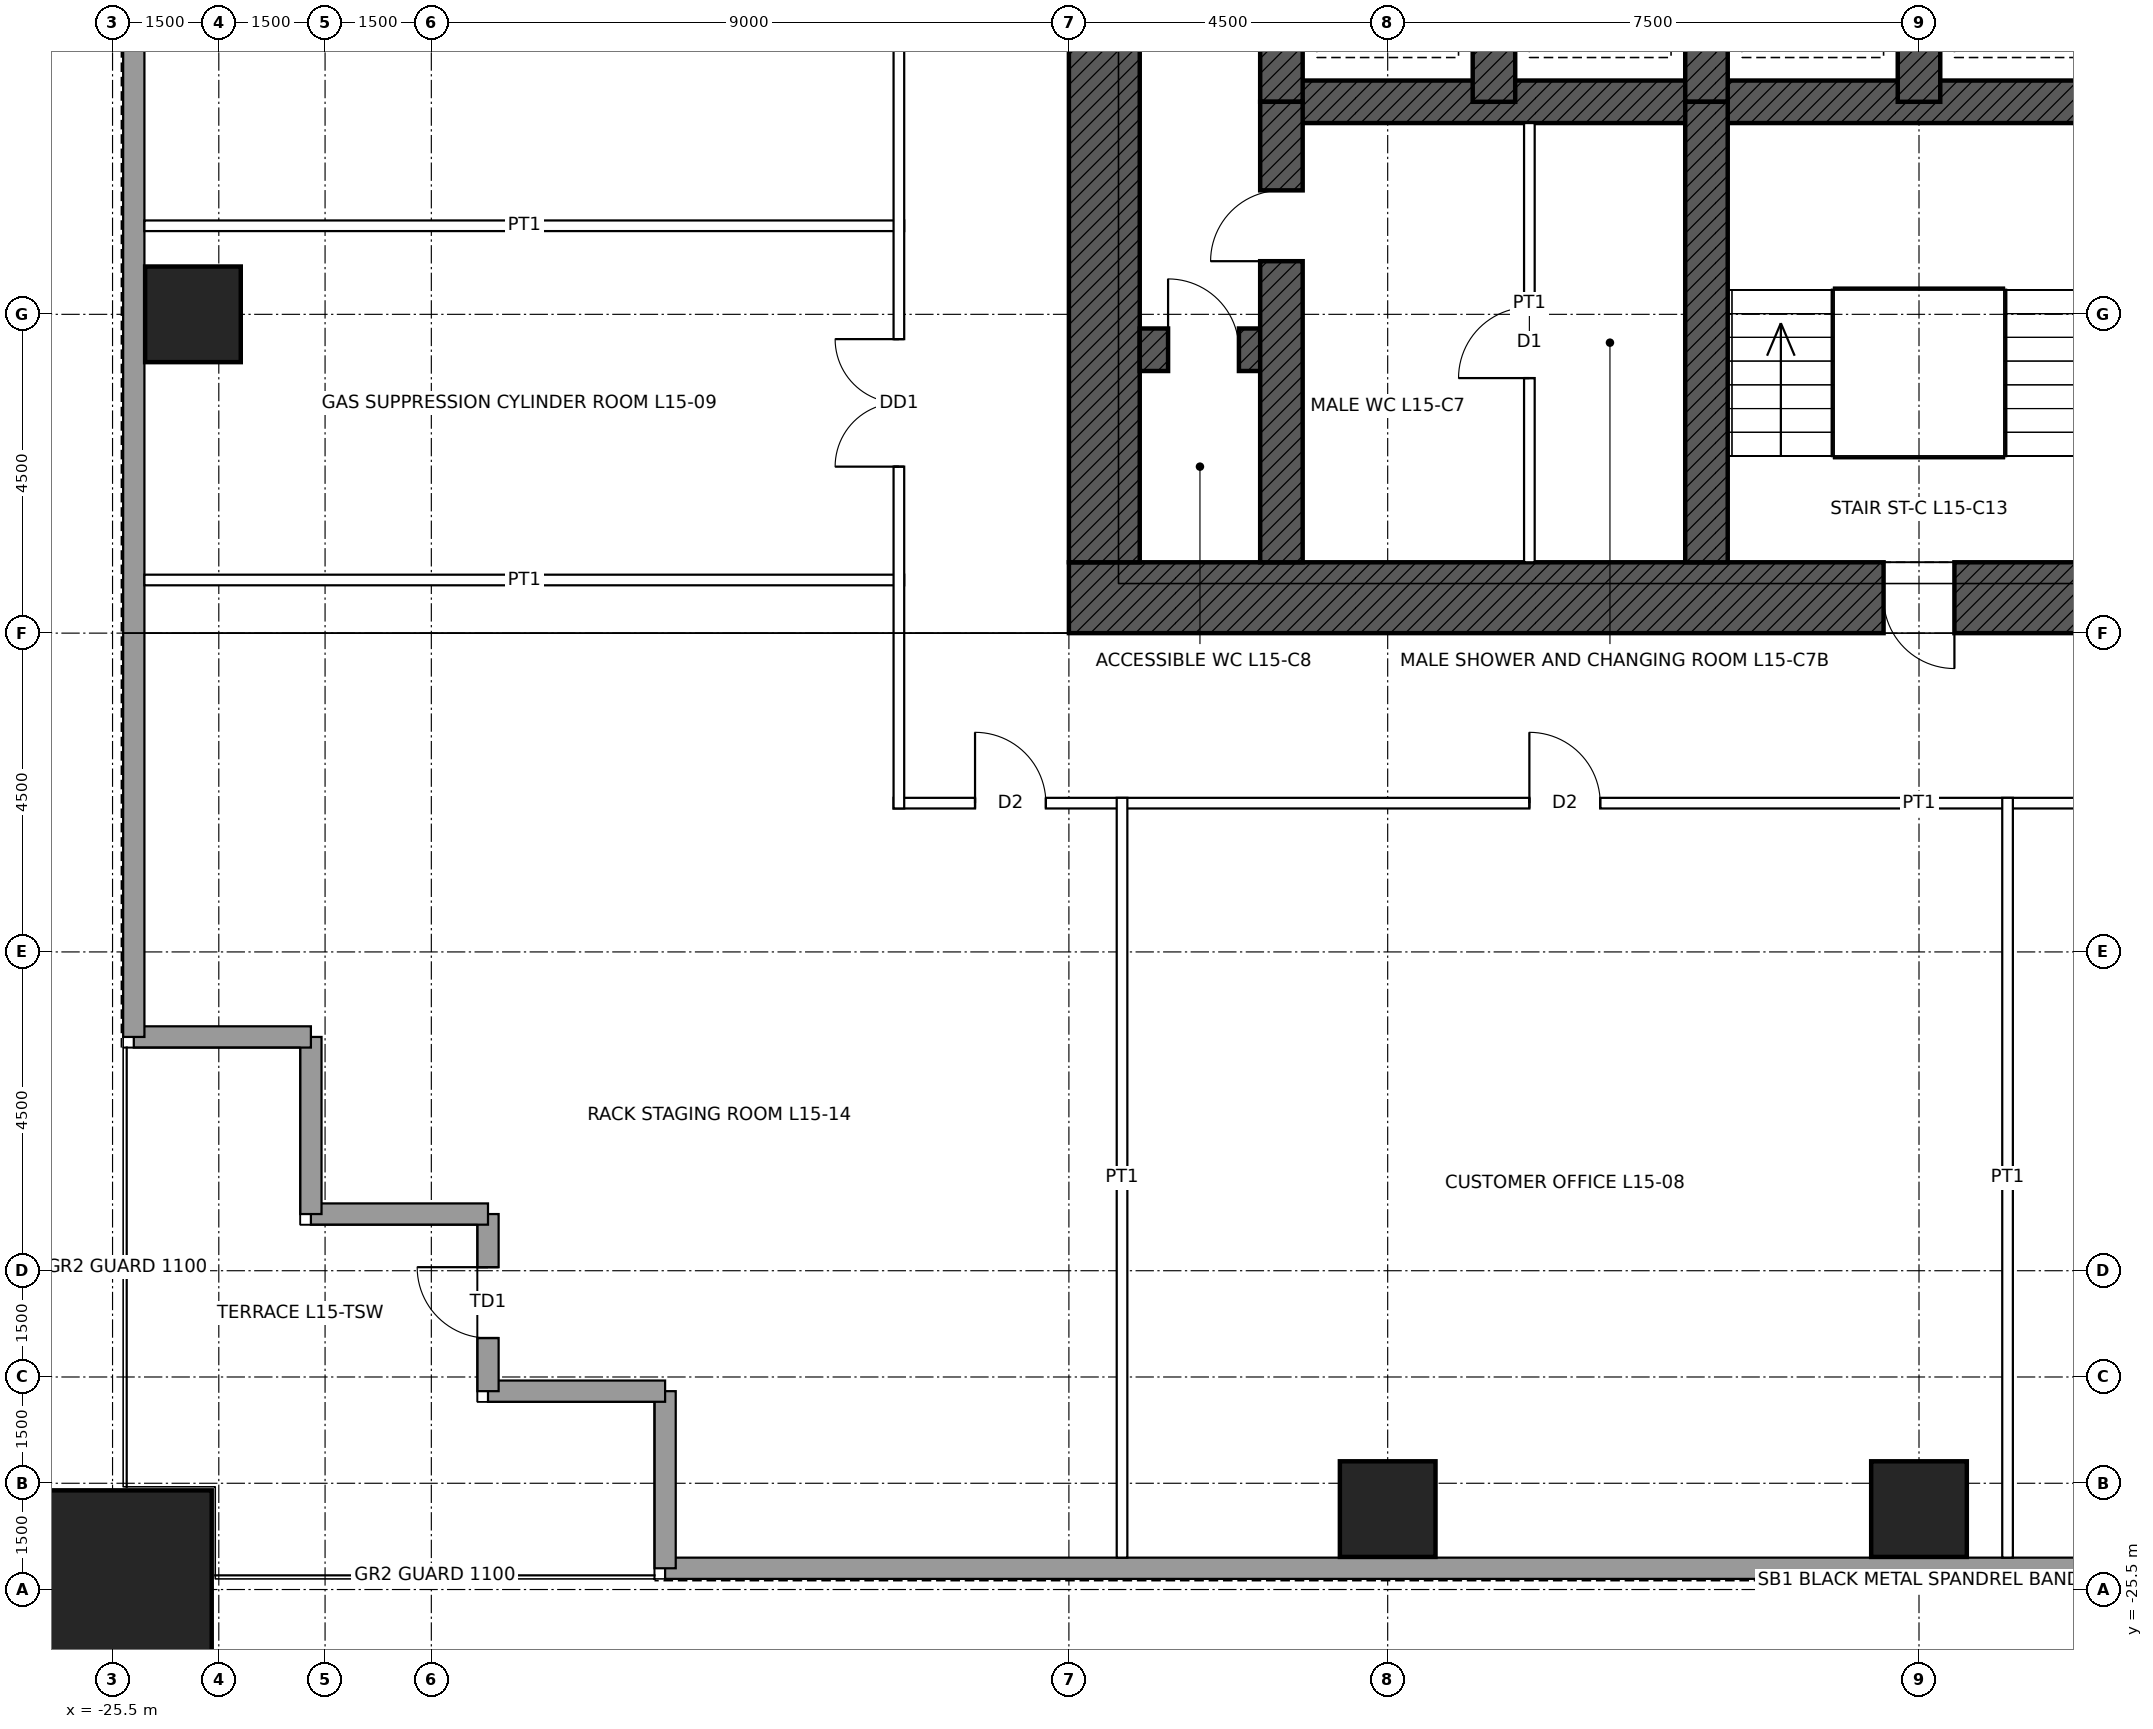
"""IFC4 building model, lengths in metres.
Left out: names, types, materials, properties, quantities, classifications, styles, units other than length and angle.
Written with IfcOpenShell. Run it as: python <this file> out.ifc"""

import sys

from ifc_helpers import new_model, si_unit, direction, frame, frame_2d, origin, origin_2d, place, context, subcontext, project, spatial, rectangle, hollow_rectangle, extrude, element, fill, save


model = new_model("IFC4")
c1 = context("Model", 3, precision=1e-05, world=origin(), true_north=direction((0.0, 1.0)))
c2 = subcontext(c1, "Body", "Model", "MODEL_VIEW")
j1 = project(units=[si_unit("LENGTHUNIT", "METRE"), si_unit("PLANEANGLEUNIT", "RADIAN")], contexts=[c1])
p1 = place(None, origin())
s1 = spatial("IfcSite", under=j1, at=p1, CompositionType="ELEMENT")
p2 = place(p1, origin())
s2 = spatial("IfcBuilding", under=s1, at=p2, CompositionType="ELEMENT")
p3 = place(p2, frame((0.0, 0.0, 78.4)))
s3 = spatial("IfcBuildingStorey", under=s2, at=p3, CompositionType="ELEMENT", Elevation=78.4)
p4 = place(p3, frame((-25.5, -25.5, 0.0), z_axis=(0.0, 0.0, 1.0), x_axis=(1.0, 0.0, 0.0)))
e1 = element("IfcColumn", 1, at=p4, inside=s3, PredefinedType="COLUMN", context=c2, shape_type="SweptSolid", body=[
    extrude(hollow_rectangle(XDim=2.8, YDim=2.8, WallThickness=0.14, at=origin_2d()), origin(), (0.0, 0.0, 1.0), 5.0),
])
for number, where, z_axis, x_axis in (
    (2, (0.0, -24.365, 0.0), (0.0, 0.0, 1.0), (1.0, 0.0, 0.0)),
    (3, (-7.5, -24.365, 0.0), (0.0, 0.0, 1.0), (1.0, 0.0, 0.0)),
    (4, (-24.365, -7.5, 0.0), (0.0, 0.0, 1.0), (1.0, 0.0, 0.0)),
):
    element("IfcColumn", number, at=place(p3, frame(where, z_axis=z_axis, x_axis=x_axis)), inside=s3, PredefinedType="COLUMN", context=c2, shape_type="SweptSolid", body=[
        extrude(hollow_rectangle(XDim=1.35, YDim=1.35, WallThickness=0.085, at=origin_2d()), origin(), (0.0, 0.0, 1.0), 5.0),
    ])
p5 = place(p3, frame((12.0, -11.5, 0.0), z_axis=(0.0, 0.0, 1.0), x_axis=(-1.0, 0.0, 0.0)))
e5 = element("IfcWall", 5, at=p5, inside=s3, PredefinedType="SHEAR", context=c2, shape_type="SweptSolid", body=[
    extrude(rectangle(XDim=24.0, YDim=1.0, at=frame_2d((12.0, 0.0))), origin(), (0.0, 0.0, 1.0), 5.0),
])
p6 = place(p5, frame((11.5, 0.0, 0.0)))
e6 = element("IfcOpeningElement", 6, at=p6, cuts=e5, PredefinedType="OPENING", context=c2, shape_type="SweptSolid", body=[
    extrude(rectangle(XDim=1.0, YDim=2.1, at=frame_2d((0.5, 1.05))), frame((0.0, 0.51, 0.0), z_axis=(0.0, -1.0, 0.0), x_axis=(1.0, 0.0, 0.0)), (0.0, 0.0, 1.0), 1.02),
])
p7 = place(p5, frame((1.0, 0.0, 0.0)))
e7 = element("IfcOpeningElement", 7, at=p7, cuts=e5, PredefinedType="OPENING", context=c2, shape_type="SweptSolid", body=[
    extrude(rectangle(XDim=1.0, YDim=2.4, at=frame_2d((0.5, 1.2))), frame((0.0, 0.51, 0.0), z_axis=(0.0, -1.0, 0.0), x_axis=(1.0, 0.0, 0.0)), (0.0, 0.0, 1.0), 1.02),
])
p8 = place(p3, frame((-11.5, -11.0, 0.0), z_axis=(0.0, 0.0, 1.0), x_axis=(0.0, 1.0, 0.0)))
e8 = element("IfcWall", 8, at=p8, inside=s3, PredefinedType="SHEAR", context=c2, shape_type="SweptSolid", body=[
    extrude(rectangle(XDim=22.0, YDim=1.0, at=frame_2d((11.0, 0.0))), origin(), (0.0, 0.0, 1.0), 5.0),
])
p9 = place(p8, frame((10.5, 0.0, 0.0)))
e9 = element("IfcOpeningElement", 9, at=p9, cuts=e8, PredefinedType="OPENING", context=c2, shape_type="SweptSolid", body=[
    extrude(rectangle(XDim=1.0, YDim=2.4, at=frame_2d((0.5, 1.2))), frame((0.0, 0.51, 0.0), z_axis=(0.0, -1.0, 0.0), x_axis=(1.0, 0.0, 0.0)), (0.0, 0.0, 1.0), 1.02),
])
p10 = place(p3, frame((-9.0, -4.5, 0.0), z_axis=(0.0, 0.0, 1.0), x_axis=(1.0, 0.0, 0.0)))
e10 = element("IfcWall", 10, at=p10, inside=s3, PredefinedType="SHEAR", context=c2, shape_type="SweptSolid", body=[
    extrude(rectangle(XDim=18.0, YDim=0.6, at=frame_2d((9.0, 0.0))), origin(), (0.0, 0.0, 1.0), 5.0),
])
p11 = place(p3, frame((-11.0, -8.0, 0.0), z_axis=(0.0, 0.0, 1.0), x_axis=(1.0, 0.0, 0.0)))
e11 = element("IfcWall", 11, at=p11, inside=s3, PredefinedType="SHEAR", context=c2, shape_type="SweptSolid", body=[
    extrude(rectangle(XDim=2.0, YDim=0.6, at=frame_2d((1.0, 0.0))), origin(), (0.0, 0.0, 1.0), 5.0),
])
p12 = place(p11, frame((0.4, 0.0, 0.0)))
e12 = element("IfcOpeningElement", 12, at=p12, cuts=e11, PredefinedType="OPENING", context=c2, shape_type="SweptSolid", body=[
    extrude(rectangle(XDim=1.0, YDim=2.1, at=frame_2d((0.5, 1.05))), frame((0.0, 0.31, 0.0), z_axis=(0.0, -1.0, 0.0), x_axis=(1.0, 0.0, 0.0)), (0.0, 0.0, 1.0), 0.62),
])
for number, where, z_axis, x_axis in (
    (13, (-9.0, -4.5, 0.0), (0.0, 0.0, 1.0), (0.0, 1.0, 0.0)),
    (14, (-6.0, -4.5, 0.0), (0.0, 0.0, 1.0), (0.0, 1.0, 0.0)),
    (15, (-3.0, -4.5, 0.0), (0.0, 0.0, 1.0), (0.0, 1.0, 0.0)),
    (16, (0.0, -4.5, 0.0), (0.0, 0.0, 1.0), (0.0, 1.0, 0.0)),
):
    element("IfcWall", number, at=place(p3, frame(where, z_axis=z_axis, x_axis=x_axis)), inside=s3, PredefinedType="SHEAR", context=c2, shape_type="SweptSolid", body=[
        extrude(rectangle(XDim=3.0, YDim=0.6, at=frame_2d((1.5, 0.0))), origin(), (0.0, 0.0, 1.0), 5.0),
    ])
p13 = place(p3, frame((-9.0, -11.0, 0.0), z_axis=(0.0, 0.0, 1.0), x_axis=(0.0, 1.0, 0.0)))
e17 = element("IfcWall", 17, at=p13, inside=s3, PredefinedType="SHEAR", context=c2, shape_type="SweptSolid", body=[
    extrude(rectangle(XDim=6.5, YDim=0.6, at=frame_2d((3.25, 0.0))), origin(), (0.0, 0.0, 1.0), 5.0),
])
p14 = place(p13, frame((4.25, 0.0, 0.0)))
e18 = element("IfcOpeningElement", 18, at=p14, cuts=e17, PredefinedType="OPENING", context=c2, shape_type="SweptSolid", body=[
    extrude(rectangle(XDim=1.0, YDim=2.1, at=frame_2d((0.5, 1.05))), frame((0.0, 0.31, 0.0), z_axis=(0.0, -1.0, 0.0), x_axis=(1.0, 0.0, 0.0)), (0.0, 0.0, 1.0), 0.62),
])
p15 = place(p3, frame((-3.0, -11.0, 0.0), z_axis=(0.0, 0.0, 1.0), x_axis=(0.0, 1.0, 0.0)))
e19 = element("IfcWall", 19, at=p15, inside=s3, PredefinedType="SHEAR", context=c2, shape_type="SweptSolid", body=[
    extrude(rectangle(XDim=6.5, YDim=0.6, at=frame_2d((3.25, 0.0))), origin(), (0.0, 0.0, 1.0), 5.0),
])
p16 = place(p3, frame((17.7, -25.2, 0.0), z_axis=(0.0, 0.0, 1.0), x_axis=(-1.0, 0.0, 0.0)))
e20 = element("IfcWall", 20, at=p16, inside=s3, PredefinedType="SOLIDWALL", context=c2, shape_type="SweptSolid", body=[
    extrude(rectangle(XDim=35.4, YDim=0.3, at=frame_2d((17.7, 0.0))), origin(), (0.0, 0.0, 1.0), 4.8),
])
for number, where, z_axis, x_axis in (
    (21, (-17.7, -25.2, 0.0), (0.0, 0.0, 1.0), (0.0, 1.0, 0.0)),
    (22, (-17.7, -22.7, 0.0), (0.0, 0.0, 1.0), (-1.0, 0.0, 0.0)),
):
    element("IfcWall", number, at=place(p3, frame(where, z_axis=z_axis, x_axis=x_axis)), inside=s3, PredefinedType="SOLIDWALL", context=c2, shape_type="SweptSolid", body=[
        extrude(rectangle(XDim=2.5, YDim=0.3, at=frame_2d((1.25, 0.0))), origin(), (0.0, 0.0, 1.0), 4.8),
    ])
p17 = place(p3, frame((-20.2, -22.7, 0.0), z_axis=(0.0, 0.0, 1.0), x_axis=(0.0, 1.0, 0.0)))
e23 = element("IfcWall", 23, at=p17, inside=s3, PredefinedType="SOLIDWALL", context=c2, shape_type="SweptSolid", body=[
    extrude(rectangle(XDim=2.5, YDim=0.3, at=frame_2d((1.25, 0.0))), origin(), (0.0, 0.0, 1.0), 4.8),
])
p18 = place(p17, frame((0.75, 0.0, 0.0)))
e24 = element("IfcOpeningElement", 24, at=p18, cuts=e23, PredefinedType="OPENING", context=c2, shape_type="SweptSolid", body=[
    extrude(rectangle(XDim=1.0, YDim=2.4, at=frame_2d((0.5, 1.2))), frame((0.0, 0.16, 0.0), z_axis=(0.0, -1.0, 0.0), x_axis=(1.0, 0.0, 0.0)), (0.0, 0.0, 1.0), 0.32),
])
for number, where, z_axis, x_axis in (
    (25, (-20.2, -20.2, 0.0), (0.0, 0.0, 1.0), (-1.0, 0.0, 0.0)),
    (26, (-22.7, -20.2, 0.0), (0.0, 0.0, 1.0), (0.0, 1.0, 0.0)),
    (27, (-22.7, -17.7, 0.0), (0.0, 0.0, 1.0), (-1.0, 0.0, 0.0)),
):
    element("IfcWall", number, at=place(p3, frame(where, z_axis=z_axis, x_axis=x_axis)), inside=s3, PredefinedType="SOLIDWALL", context=c2, shape_type="SweptSolid", body=[
        extrude(rectangle(XDim=2.5, YDim=0.3, at=frame_2d((1.25, 0.0))), origin(), (0.0, 0.0, 1.0), 4.8),
    ])
p19 = place(p3, frame((-25.2, -17.7, 0.0), z_axis=(0.0, 0.0, 1.0), x_axis=(0.0, 1.0, 0.0)))
e28 = element("IfcWall", 28, at=p19, inside=s3, PredefinedType="SOLIDWALL", context=c2, shape_type="SweptSolid", body=[
    extrude(rectangle(XDim=35.4, YDim=0.3, at=frame_2d((17.7, 0.0))), origin(), (0.0, 0.0, 1.0), 4.8),
])
p20 = place(p3, frame((-14.475, -14.4, 0.0), z_axis=(0.0, 0.0, 1.0), x_axis=(1.0, 0.0, 0.0)))
e29 = element("IfcWall", 29, at=p20, inside=s3, PredefinedType="PARTITIONING", context=c2, shape_type="SweptSolid", body=[
    extrude(rectangle(XDim=28.95, YDim=0.15, at=frame_2d((14.475, 0.0))), origin(), (0.0, 0.0, 1.0), 4.8),
])
p21 = place(p20, frame((19.825, 0.0, 0.0)))
e30 = element("IfcOpeningElement", 30, at=p21, cuts=e29, PredefinedType="OPENING", context=c2, shape_type="SweptSolid", body=[
    extrude(rectangle(XDim=1.8, YDim=2.4, at=frame_2d((0.9, 1.2))), frame((0.0, 0.085, 0.0), z_axis=(0.0, -1.0, 0.0), x_axis=(1.0, 0.0, 0.0)), (0.0, 0.0, 1.0), 0.17),
])
p22 = place(p20, frame((8.975, 0.0, 0.0)))
e31 = element("IfcOpeningElement", 31, at=p22, cuts=e29, PredefinedType="OPENING", context=c2, shape_type="SweptSolid", body=[
    extrude(rectangle(XDim=1.0, YDim=2.1, at=frame_2d((0.5, 1.05))), frame((0.0, 0.085, 0.0), z_axis=(0.0, -1.0, 0.0), x_axis=(1.0, 0.0, 0.0)), (0.0, 0.0, 1.0), 0.17),
])
p23 = place(p20, frame((26.8, 0.0, 0.0)))
e32 = element("IfcOpeningElement", 32, at=p23, cuts=e29, PredefinedType="OPENING", context=c2, shape_type="SweptSolid", body=[
    extrude(rectangle(XDim=1.0, YDim=2.1, at=frame_2d((0.5, 1.05))), frame((0.0, 0.085, 0.0), z_axis=(0.0, -1.0, 0.0), x_axis=(1.0, 0.0, 0.0)), (0.0, 0.0, 1.0), 0.17),
])
p24 = place(p20, frame((1.15, 0.0, 0.0)))
e33 = element("IfcOpeningElement", 33, at=p24, cuts=e29, PredefinedType="OPENING", context=c2, shape_type="SweptSolid", body=[
    extrude(rectangle(XDim=1.0, YDim=2.1, at=frame_2d((0.5, 1.05))), frame((0.0, 0.085, 0.0), z_axis=(0.0, -1.0, 0.0), x_axis=(1.0, 0.0, 0.0)), (0.0, 0.0, 1.0), 0.17),
])
p25 = place(p3, frame((-25.05, -11.25, 0.0), z_axis=(0.0, 0.0, 1.0), x_axis=(1.0, 0.0, 0.0)))
e34 = element("IfcWall", 34, at=p25, inside=s3, PredefinedType="PARTITIONING", context=c2, shape_type="SweptSolid", body=[
    extrude(rectangle(XDim=10.725, YDim=0.15, at=frame_2d((5.363, 0.0))), origin(), (0.0, 0.0, 1.0), 3.853),
])
p26 = place(p3, frame((-25.05, -6.25, 0.0), z_axis=(0.0, 0.0, 1.0), x_axis=(1.0, 0.0, 0.0)))
e35 = element("IfcWall", 35, at=p26, inside=s3, PredefinedType="PARTITIONING", context=c2, shape_type="SweptSolid", body=[
    extrude(rectangle(XDim=10.725, YDim=0.15, at=frame_2d((5.363, 0.0))), origin(), (0.0, 0.0, 1.0), 4.8),
])
p27 = place(p3, frame((-14.4, -14.475, 0.0), z_axis=(0.0, 0.0, 1.0), x_axis=(0.0, 1.0, 0.0)))
e36 = element("IfcWall", 36, at=p27, inside=s3, PredefinedType="PARTITIONING", context=c2, shape_type="SweptSolid", body=[
    extrude(rectangle(XDim=28.95, YDim=0.15, at=frame_2d((14.475, 0.0))), origin(), (0.0, 0.0, 1.0), 4.8),
])
p28 = place(p27, frame((4.825, 0.0, 0.0)))
e37 = element("IfcOpeningElement", 37, at=p28, cuts=e36, PredefinedType="OPENING", context=c2, shape_type="SweptSolid", body=[
    extrude(rectangle(XDim=1.8, YDim=2.4, at=frame_2d((0.9, 1.2))), frame((0.0, 0.085, 0.0), z_axis=(0.0, -1.0, 0.0), x_axis=(1.0, 0.0, 0.0)), (0.0, 0.0, 1.0), 0.17),
])
p29 = place(p27, frame((11.075, 0.0, 0.0)))
e38 = element("IfcOpeningElement", 38, at=p29, cuts=e36, PredefinedType="OPENING", context=c2, shape_type="SweptSolid", body=[
    extrude(rectangle(XDim=1.8, YDim=2.4, at=frame_2d((0.9, 1.2))), frame((0.0, 0.085, 0.0), z_axis=(0.0, -1.0, 0.0), x_axis=(1.0, 0.0, 0.0)), (0.0, 0.0, 1.0), 0.17),
])
p30 = place(p27, frame((20.225, 0.0, 0.0)))
e39 = element("IfcOpeningElement", 39, at=p30, cuts=e36, PredefinedType="OPENING", context=c2, shape_type="SweptSolid", body=[
    extrude(rectangle(XDim=1.0, YDim=2.1, at=frame_2d((0.5, 1.05))), frame((0.0, 0.085, 0.0), z_axis=(0.0, -1.0, 0.0), x_axis=(1.0, 0.0, 0.0)), (0.0, 0.0, 1.0), 0.17),
])
p31 = place(p3, frame((-11.25, -25.05, 0.0), z_axis=(0.0, 0.0, 1.0), x_axis=(0.0, 1.0, 0.0)))
e40 = element("IfcWall", 40, at=p31, inside=s3, PredefinedType="PARTITIONING", context=c2, shape_type="SweptSolid", body=[
    extrude(rectangle(XDim=10.725, YDim=0.15, at=frame_2d((5.363, 0.0))), origin(), (0.0, 0.0, 1.0), 3.853),
])
p32 = place(p3, frame((1.25, -25.05, 0.0), z_axis=(0.0, 0.0, 1.0), x_axis=(0.0, 1.0, 0.0)))
e41 = element("IfcWall", 41, at=p32, inside=s3, PredefinedType="PARTITIONING", context=c2, shape_type="SweptSolid", body=[
    extrude(rectangle(XDim=10.725, YDim=0.15, at=frame_2d((5.363, 0.0))), origin(), (0.0, 0.0, 1.0), 4.8),
])
p33 = place(p3, frame((-5.5, -11.0, 0.0), z_axis=(0.0, 0.0, 1.0), x_axis=(0.0, 1.0, 0.0)))
e42 = element("IfcWall", 42, at=p33, inside=s3, PredefinedType="PARTITIONING", context=c2, shape_type="SweptSolid", body=[
    extrude(rectangle(XDim=6.2, YDim=0.15, at=frame_2d((3.1, 0.0))), origin(), (0.0, 0.0, 1.0), 4.75),
])
p34 = place(p33, frame((2.6, 0.0, 0.0)))
e43 = element("IfcOpeningElement", 43, at=p34, cuts=e42, PredefinedType="OPENING", context=c2, shape_type="SweptSolid", body=[
    extrude(rectangle(XDim=1.0, YDim=2.1, at=frame_2d((0.5, 1.05))), frame((0.0, 0.085, 0.0), z_axis=(0.0, -1.0, 0.0), x_axis=(1.0, 0.0, 0.0)), (0.0, 0.0, 1.0), 0.17),
])
p35 = place(p18, origin())
e44 = element("IfcDoor", 44, at=p35, inside=s3, OperationType="SINGLE_SWING_RIGHT", PredefinedType="DOOR", context=c2, shape_type="SweptSolid", body=[
    extrude(rectangle(XDim=1.0, YDim=2.4, at=frame_2d((0.5, 1.2))), frame((0.0, 0.025, 0.0), z_axis=(0.0, -1.0, 0.0), x_axis=(1.0, 0.0, 0.0)), (0.0, 0.0, 1.0), 0.05),
])
fill(e24, e44)
p36 = place(p6, origin())
e45 = element("IfcDoor", 45, at=p36, inside=s3, OperationType="SINGLE_SWING_LEFT", PredefinedType="DOOR", context=c2, shape_type="SweptSolid", body=[
    extrude(rectangle(XDim=1.0, YDim=2.1, at=frame_2d((0.5, 1.05))), frame((0.0, 0.485, 0.0), z_axis=(0.0, -1.0, 0.0), x_axis=(1.0, 0.0, 0.0)), (0.0, 0.0, 1.0), 0.05),
])
fill(e6, e45)
p37 = place(p14, origin())
e46 = element("IfcDoor", 46, at=p37, inside=s3, OperationType="SINGLE_SWING_LEFT", PredefinedType="DOOR", context=c2, shape_type="SweptSolid", body=[
    extrude(rectangle(XDim=1.0, YDim=2.1, at=frame_2d((0.5, 1.05))), frame((0.0, 0.025, 0.0), z_axis=(0.0, -1.0, 0.0), x_axis=(1.0, 0.0, 0.0)), (0.0, 0.0, 1.0), 0.05),
])
fill(e18, e46)
p38 = place(p12, origin())
e47 = element("IfcDoor", 47, at=p38, inside=s3, OperationType="SINGLE_SWING_LEFT", PredefinedType="DOOR", context=c2, shape_type="SweptSolid", body=[
    extrude(rectangle(XDim=1.0, YDim=2.1, at=frame_2d((0.5, 1.05))), frame((0.0, 0.025, 0.0), z_axis=(0.0, -1.0, 0.0), x_axis=(1.0, 0.0, 0.0)), (0.0, 0.0, 1.0), 0.05),
])
fill(e12, e47)
p39 = place(p34, origin())
e48 = element("IfcDoor", 48, at=p39, inside=s3, OperationType="SINGLE_SWING_LEFT", PredefinedType="DOOR", context=c2, shape_type="SweptSolid", body=[
    extrude(rectangle(XDim=1.0, YDim=2.1, at=frame_2d((0.5, 1.05))), frame((0.0, 0.025, 0.0), z_axis=(0.0, -1.0, 0.0), x_axis=(1.0, 0.0, 0.0)), (0.0, 0.0, 1.0), 0.05),
])
fill(e43, e48)
p40 = place(p22, origin())
e49 = element("IfcDoor", 49, at=p40, inside=s3, OperationType="SINGLE_SWING_LEFT", PredefinedType="DOOR", context=c2, shape_type="SweptSolid", body=[
    extrude(rectangle(XDim=1.0, YDim=2.1, at=frame_2d((0.5, 1.05))), frame((0.0, 0.025, 0.0), z_axis=(0.0, -1.0, 0.0), x_axis=(1.0, 0.0, 0.0)), (0.0, 0.0, 1.0), 0.05),
])
fill(e31, e49)
p41 = place(p28, origin())
e50 = element("IfcDoor", 50, at=p41, inside=s3, OperationType="DOUBLE_DOOR_SINGLE_SWING", PredefinedType="DOOR", context=c2, shape_type="SweptSolid", body=[
    extrude(rectangle(XDim=1.8, YDim=2.4, at=frame_2d((0.9, 1.2))), frame((0.0, 0.025, 0.0), z_axis=(0.0, -1.0, 0.0), x_axis=(1.0, 0.0, 0.0)), (0.0, 0.0, 1.0), 0.05),
])
fill(e37, e50)
p42 = place(p24, origin())
e51 = element("IfcDoor", 51, at=p42, inside=s3, OperationType="SINGLE_SWING_LEFT", PredefinedType="DOOR", context=c2, shape_type="SweptSolid", body=[
    extrude(rectangle(XDim=1.0, YDim=2.1, at=frame_2d((0.5, 1.05))), frame((0.0, 0.025, 0.0), z_axis=(0.0, -1.0, 0.0), x_axis=(1.0, 0.0, 0.0)), (0.0, 0.0, 1.0), 0.05),
])
fill(e33, e51)
save(model, sys.argv[1])
